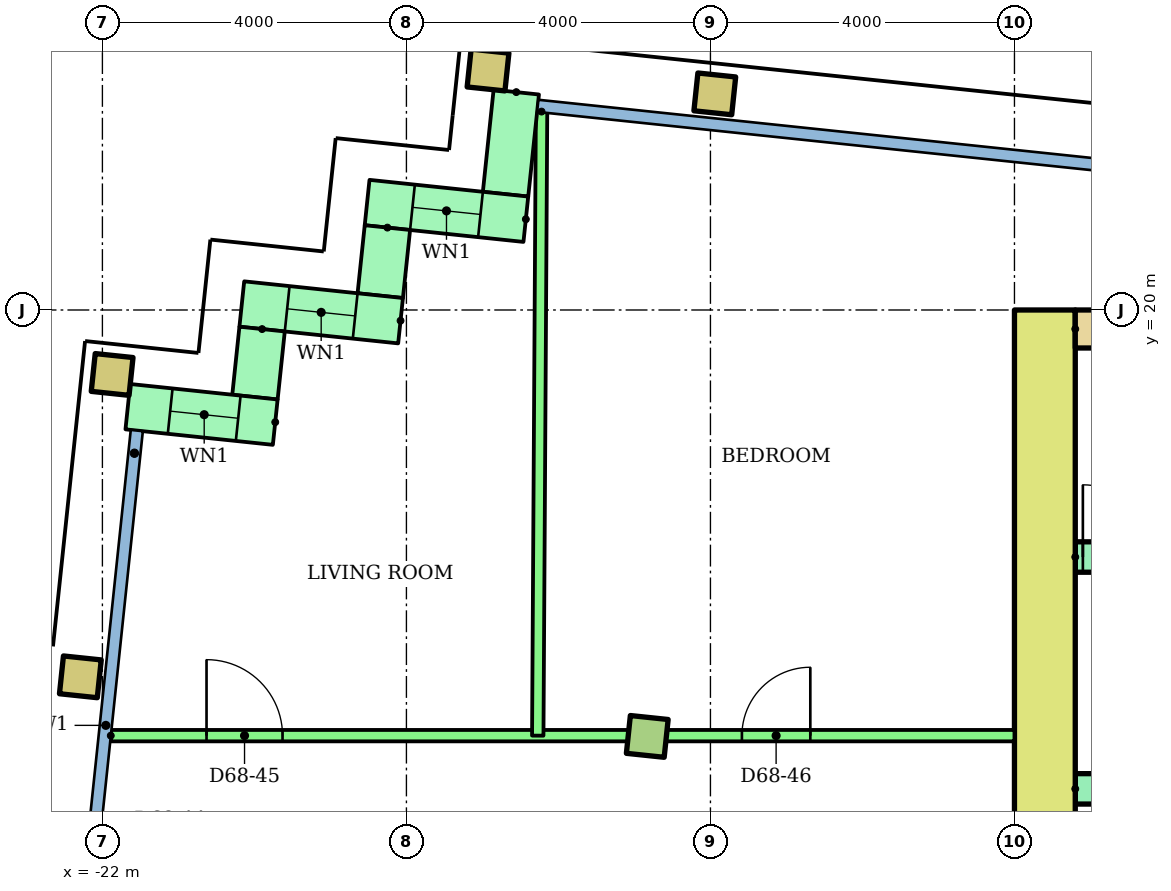
"""IFC4 building model, lengths in metres.
Left out: names, types, materials, properties, quantities, classifications, styles, units other than length and angle.
Written with IfcOpenShell. Run it as: python <this file> out.ifc"""

import sys

from ifc_helpers import new_model, si_unit, direction, frame, frame_2d, origin, origin_2d, place, context, subcontext, project, spatial, rectangle, hollow_rectangle, extrude, element, fill, save


model = new_model("IFC4")
c1 = context("Model", 3, precision=1e-05, world=origin(), true_north=direction((0.0, 1.0)))
c2 = subcontext(c1, "Body", "Model", "MODEL_VIEW")
j1 = project(units=[si_unit("LENGTHUNIT", "METRE"), si_unit("PLANEANGLEUNIT", "RADIAN")], contexts=[c1])
p1 = place(None, origin())
s1 = spatial("IfcSite", under=j1, at=p1, CompositionType="ELEMENT")
p2 = place(p1, origin())
s2 = spatial("IfcBuilding", under=s1, at=p2, CompositionType="ELEMENT")
p3 = place(p2, frame((0.0, 0.0, 262.7)))
s3 = spatial("IfcBuildingStorey", under=s2, at=p3, CompositionType="ELEMENT", Elevation=262.7)
p4 = place(p3, frame((-22.29, 15.174, 0.0), z_axis=(0.0, 0.0, 1.0), x_axis=(0.994521895368, -0.104528463268, 0.0)))
e1 = element("IfcColumn", 1, at=p4, inside=s3, PredefinedType="COLUMN", context=c2, shape_type="SweptSolid", body=[
    extrude(hollow_rectangle(XDim=0.5, YDim=0.5, WallThickness=0.025, at=origin_2d()), origin(), (0.0, 0.0, 1.0), 3.2),
])
p5 = place(p3, frame((-14.831, 14.39, 0.0), z_axis=(0.0, 0.0, 1.0), x_axis=(0.994521895368, -0.104528463268, 0.0)))
e2 = element("IfcColumn", 2, at=p5, inside=s3, PredefinedType="COLUMN", context=c2, shape_type="SweptSolid", body=[
    extrude(rectangle(XDim=0.5, YDim=0.5, at=origin_2d()), origin(), (0.0, 0.0, 1.0), 3.2),
])
for number, where, z_axis, x_axis in (
    (3, (-21.872, 19.152, 0.0), (0.0, 0.0, 1.0), (0.995, -0.105, 0.0)),
    (4, (-16.926, 23.157, 0.0), (0.0, 0.0, 1.0), (0.995, -0.105, 0.0)),
    (5, (-13.943, 22.843, 0.0), (0.0, 0.0, 1.0), (0.995, -0.105, 0.0)),
):
    element("IfcColumn", number, at=place(p3, frame(where, z_axis=z_axis, x_axis=x_axis)), inside=s3, PredefinedType="COLUMN", context=c2, shape_type="SweptSolid", body=[
        extrude(hollow_rectangle(XDim=0.5, YDim=0.5, WallThickness=0.025, at=origin_2d()), origin(), (0.0, 0.0, 1.0), 3.2),
    ])
p6 = place(p3, frame((-16.555, 22.866, 0.0), z_axis=(0.0, 0.0, 1.0), x_axis=(-0.104515354875, -0.994523273029, 0.0)))
e6 = element("IfcWall", 6, at=p6, inside=s3, PredefinedType="STANDARD", context=c2, shape_type="SweptSolid", body=[
    extrude(rectangle(XDim=1.35, YDim=0.6, at=frame_2d((0.675, 0.0))), origin(), (0.0, 0.0, 1.0), 2.92),
])
p7 = place(p3, frame((-16.429, 21.194, 0.0), z_axis=(0.0, 0.0, 1.0), x_axis=(-0.994522640205, 0.104521376379, 0.0)))
e7 = element("IfcWall", 7, at=p7, inside=s3, PredefinedType="STANDARD", context=c2, shape_type="SweptSolid", body=[
    extrude(rectangle(XDim=2.1, YDim=0.6, at=frame_2d((1.05, 0.0))), origin(), (0.0, 0.0, 1.0), 2.92),
])
p8 = place(p7, frame((0.6, 0.0, 0.9)))
e8 = element("IfcOpeningElement", 8, at=p8, cuts=e7, PredefinedType="OPENING", context=c2, shape_type="SweptSolid", body=[
    extrude(rectangle(XDim=0.9, YDim=1.5, at=frame_2d((0.45, 0.75))), frame((0.0, 0.31, 0.0), z_axis=(0.0, -1.0, 0.0), x_axis=(1.0, 0.0, 0.0)), (0.0, 0.0, 1.0), 0.62),
])
p9 = place(p3, frame((-18.25, 21.084, 0.0), z_axis=(0.0, 0.0, 1.0), x_axis=(-0.104416541099, -0.994533652495, 0.0)))
e9 = element("IfcWall", 9, at=p9, inside=s3, PredefinedType="STANDARD", context=c2, shape_type="SweptSolid", body=[
    extrude(rectangle(XDim=0.9, YDim=0.6, at=frame_2d((0.45, 0.0))), origin(), (0.0, 0.0, 1.0), 2.92),
])
p10 = place(p3, frame((-18.077, 19.859, 0.0), z_axis=(0.0, 0.0, 1.0), x_axis=(-0.994522640205, 0.104521376379, 0.0)))
e10 = element("IfcWall", 10, at=p10, inside=s3, PredefinedType="STANDARD", context=c2, shape_type="SweptSolid", body=[
    extrude(rectangle(XDim=2.1, YDim=0.6, at=frame_2d((1.05, 0.0))), origin(), (0.0, 0.0, 1.0), 2.92),
])
p11 = place(p10, frame((0.6, 0.0, 0.9)))
e11 = element("IfcOpeningElement", 11, at=p11, cuts=e10, PredefinedType="OPENING", context=c2, shape_type="SweptSolid", body=[
    extrude(rectangle(XDim=0.9, YDim=1.5, at=frame_2d((0.45, 0.75))), frame((0.0, 0.31, 0.0), z_axis=(0.0, -1.0, 0.0), x_axis=(1.0, 0.0, 0.0)), (0.0, 0.0, 1.0), 0.62),
])
p12 = place(p3, frame((-19.899, 19.749, 0.0), z_axis=(0.0, 0.0, 1.0), x_axis=(-0.104741284723, -0.994499503909, 0.0)))
e12 = element("IfcWall", 12, at=p12, inside=s3, PredefinedType="STANDARD", context=c2, shape_type="SweptSolid", body=[
    extrude(rectangle(XDim=0.9, YDim=0.6, at=frame_2d((0.45, 0.0))), origin(), (0.0, 0.0, 1.0), 2.92),
])
p13 = place(p3, frame((-19.726, 18.524, 0.0), z_axis=(0.0, 0.0, 1.0), x_axis=(-0.994534226826, 0.104411070641, 0.0)))
e13 = element("IfcWall", 13, at=p13, inside=s3, PredefinedType="STANDARD", context=c2, shape_type="SweptSolid", body=[
    extrude(rectangle(XDim=1.95, YDim=0.6, at=frame_2d((0.975, 0.0))), origin(), (0.0, 0.0, 1.0), 2.92),
])
p14 = place(p13, frame((0.49, 0.0, 0.9)))
e14 = element("IfcOpeningElement", 14, at=p14, cuts=e13, PredefinedType="OPENING", context=c2, shape_type="SweptSolid", body=[
    extrude(rectangle(XDim=0.9, YDim=1.5, at=frame_2d((0.45, 0.75))), frame((0.0, 0.31, 0.0), z_axis=(0.0, -1.0, 0.0), x_axis=(1.0, 0.0, 0.0)), (0.0, 0.0, 1.0), 0.62),
])
p15 = place(p3, frame((-9.6, 6.4, 0.0), z_axis=(0.0, 0.0, 1.0), x_axis=(0.0, 1.0, 0.0)))
e15 = element("IfcWall", 15, at=p15, inside=s3, PredefinedType="SHEAR", context=c2, shape_type="SweptSolid", body=[
    extrude(rectangle(XDim=13.6, YDim=0.8, at=frame_2d((6.8, 0.0))), origin(), (0.0, 0.0, 1.0), 2.92),
])
p16 = place(p3, frame((-9.2, 19.75, 0.0)))
e16 = element("IfcWall", 16, at=p16, inside=s3, PredefinedType="SHEAR", context=c2, shape_type="SweptSolid", body=[
    extrude(rectangle(XDim=18.4, YDim=0.5, at=frame_2d((9.2, 0.0))), origin(), (0.0, 0.0, 1.0), 2.92),
])
p17 = place(p3, frame((-9.2, 13.7, 0.0)))
e17 = element("IfcWall", 17, at=p17, inside=s3, PredefinedType="SHEAR", context=c2, shape_type="SweptSolid", body=[
    extrude(rectangle(XDim=8.0, YDim=0.4, at=frame_2d((4.0, 0.0))), origin(), (0.0, 0.0, 1.0), 2.92),
])
p18 = place(p3, frame((-9.2, 16.75, 0.0)))
e18 = element("IfcWall", 18, at=p18, inside=s3, PredefinedType="SHEAR", context=c2, shape_type="SweptSolid", body=[
    extrude(rectangle(XDim=18.4, YDim=0.4, at=frame_2d((9.2, 0.0))), origin(), (0.0, 0.0, 1.0), 2.92),
])
p19 = place(p18, frame((0.1, 0.0, 0.0)))
e19 = element("IfcOpeningElement", 19, at=p19, cuts=e18, PredefinedType="OPENING", context=c2, shape_type="SweptSolid", body=[
    extrude(rectangle(XDim=0.95, YDim=2.1, at=frame_2d((0.475, 1.05))), frame((0.0, 0.21, 0.0), z_axis=(0.0, -1.0, 0.0), x_axis=(1.0, 0.0, 0.0)), (0.0, 0.0, 1.0), 0.42),
])
p20 = place(p18, frame((6.1, 0.0, 0.0)))
e20 = element("IfcOpeningElement", 20, at=p20, cuts=e18, PredefinedType="OPENING", context=c2, shape_type="SweptSolid", body=[
    extrude(rectangle(XDim=0.95, YDim=2.1, at=frame_2d((0.475, 1.05))), frame((0.0, 0.21, 0.0), z_axis=(0.0, -1.0, 0.0), x_axis=(1.0, 0.0, 0.0)), (0.0, 0.0, 1.0), 0.42),
])
p21 = place(p18, frame((12.1, 0.0, 0.0)))
e21 = element("IfcOpeningElement", 21, at=p21, cuts=e18, PredefinedType="OPENING", context=c2, shape_type="SweptSolid", body=[
    extrude(rectangle(XDim=0.95, YDim=2.1, at=frame_2d((0.475, 1.05))), frame((0.0, 0.21, 0.0), z_axis=(0.0, -1.0, 0.0), x_axis=(1.0, 0.0, 0.0)), (0.0, 0.0, 1.0), 0.42),
])
p22 = place(p3, frame((-21.89, 14.4, 0.0)))
e22 = element("IfcWall", 22, at=p22, inside=s3, PredefinedType="PARTITIONING", context=c2, shape_type="SweptSolid", body=[
    extrude(rectangle(XDim=11.89, YDim=0.15, at=frame_2d((5.945, 0.0))), origin(), (0.0, 0.0, 1.0), 2.4),
])
p23 = place(p22, frame((1.26, 0.0, 0.0)))
e23 = element("IfcOpeningElement", 23, at=p23, cuts=e22, PredefinedType="OPENING", context=c2, shape_type="SweptSolid", body=[
    extrude(rectangle(XDim=1.0, YDim=2.1, at=frame_2d((0.5, 1.05))), frame((0.0, 0.085, 0.0), z_axis=(0.0, -1.0, 0.0), x_axis=(1.0, 0.0, 0.0)), (0.0, 0.0, 1.0), 0.17),
])
p24 = place(p22, frame((8.304, 0.0, 0.0)))
e24 = element("IfcOpeningElement", 24, at=p24, cuts=e22, PredefinedType="OPENING", context=c2, shape_type="SweptSolid", body=[
    extrude(rectangle(XDim=0.9, YDim=2.1, at=frame_2d((0.45, 1.05))), frame((0.0, 0.085, 0.0), z_axis=(0.0, -1.0, 0.0), x_axis=(1.0, 0.0, 0.0)), (0.0, 0.0, 1.0), 0.17),
])
p25 = place(p3, frame((-16.222, 22.61, 0.0), z_axis=(0.0, 0.0, 1.0), x_axis=(-0.006095634594, -0.999981421447, 0.0)))
e25 = element("IfcWall", 25, at=p25, inside=s3, PredefinedType="PARTITIONING", context=c2, shape_type="SweptSolid", body=[
    extrude(rectangle(XDim=8.211, YDim=0.15, at=frame_2d((4.105, 0.0))), origin(), (0.0, 0.0, 1.0), 2.4),
])
p26 = place(p8, origin())
e26 = element("IfcWindow", 26, at=p26, inside=s3, PartitioningType="SINGLE_PANEL", PredefinedType="WINDOW", context=c2, shape_type="SweptSolid", body=[
    extrude(rectangle(XDim=0.9, YDim=1.5, at=frame_2d((0.45, 0.75))), frame((0.0, 0.03, 0.0), z_axis=(0.0, -1.0, 0.0), x_axis=(1.0, 0.0, 0.0)), (0.0, 0.0, 1.0), 0.06),
])
fill(e8, e26)
p27 = place(p11, origin())
e27 = element("IfcWindow", 27, at=p27, inside=s3, PartitioningType="SINGLE_PANEL", PredefinedType="WINDOW", context=c2, shape_type="SweptSolid", body=[
    extrude(rectangle(XDim=0.9, YDim=1.5, at=frame_2d((0.45, 0.75))), frame((0.0, 0.03, 0.0), z_axis=(0.0, -1.0, 0.0), x_axis=(1.0, 0.0, 0.0)), (0.0, 0.0, 1.0), 0.06),
])
fill(e11, e27)
p28 = place(p14, origin())
e28 = element("IfcWindow", 28, at=p28, inside=s3, PartitioningType="SINGLE_PANEL", PredefinedType="WINDOW", context=c2, shape_type="SweptSolid", body=[
    extrude(rectangle(XDim=0.9, YDim=1.5, at=frame_2d((0.45, 0.75))), frame((0.0, 0.03, 0.0), z_axis=(0.0, -1.0, 0.0), x_axis=(1.0, 0.0, 0.0)), (0.0, 0.0, 1.0), 0.06),
])
fill(e14, e28)
p29 = place(p19, origin())
e29 = element("IfcDoor", 29, at=p29, inside=s3, OperationType="SINGLE_SWING_LEFT", PredefinedType="DOOR", context=c2, shape_type="SweptSolid", body=[
    extrude(rectangle(XDim=0.95, YDim=2.1, at=frame_2d((0.475, 1.05))), frame((0.0, 0.025, 0.0), z_axis=(0.0, -1.0, 0.0), x_axis=(1.0, 0.0, 0.0)), (0.0, 0.0, 1.0), 0.05),
])
fill(e19, e29)
p30 = place(p23, origin())
e30 = element("IfcDoor", 30, at=p30, inside=s3, OperationType="SINGLE_SWING_LEFT", PredefinedType="DOOR", context=c2, shape_type="SweptSolid", body=[
    extrude(rectangle(XDim=1.0, YDim=2.1, at=frame_2d((0.5, 1.05))), frame((0.0, 0.025, 0.0), z_axis=(0.0, -1.0, 0.0), x_axis=(1.0, 0.0, 0.0)), (0.0, 0.0, 1.0), 0.05),
])
fill(e23, e30)
p31 = place(p24, origin())
e31 = element("IfcDoor", 31, at=p31, inside=s3, OperationType="SINGLE_SWING_RIGHT", PredefinedType="DOOR", context=c2, shape_type="SweptSolid", body=[
    extrude(rectangle(XDim=0.9, YDim=2.1, at=frame_2d((0.45, 1.05))), frame((0.0, 0.025, 0.0), z_axis=(0.0, -1.0, 0.0), x_axis=(1.0, 0.0, 0.0)), (0.0, 0.0, 1.0), 0.05),
])
fill(e24, e31)
save(model, sys.argv[1])
